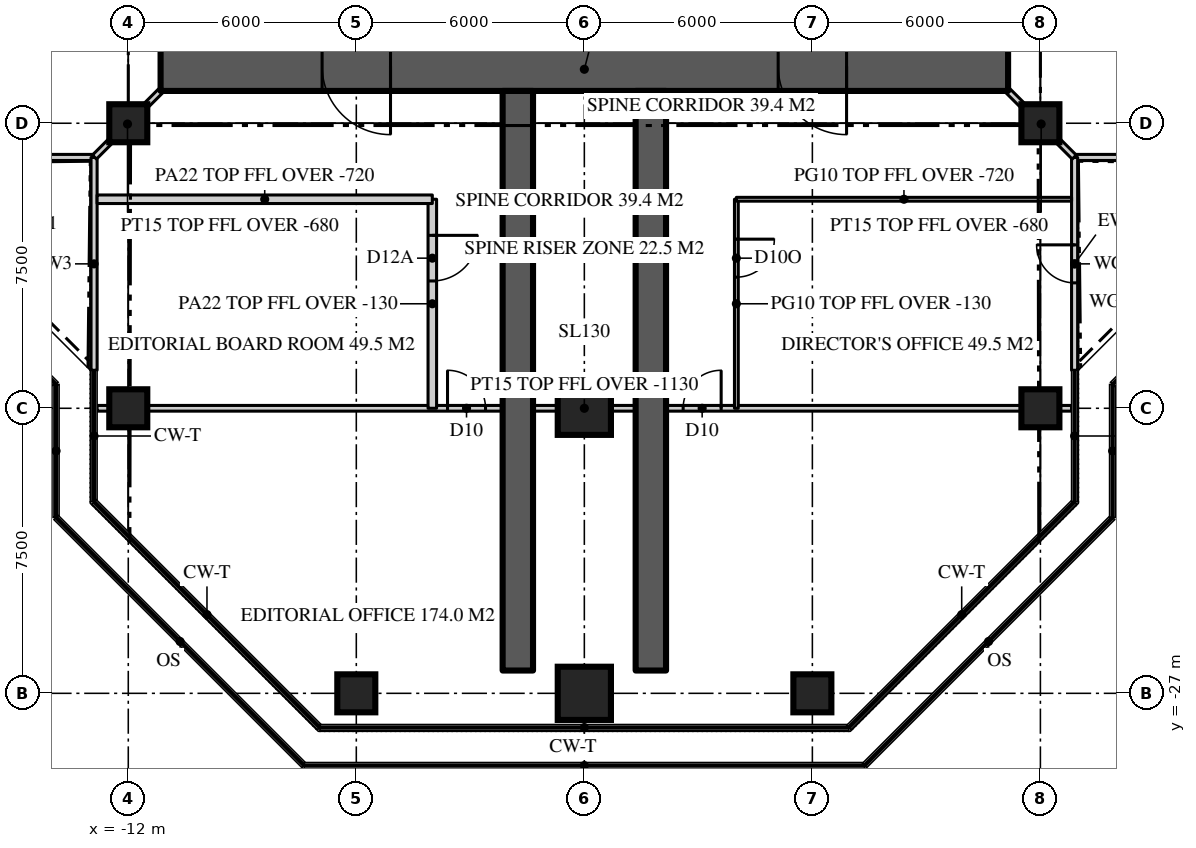
"""IFC4 building model, lengths in metres.
Left out: names, types, materials, properties, quantities, classifications, styles, units other than length and angle.
Written with IfcOpenShell. Run it as: python <this file> out.ifc"""

import sys

from ifc_helpers import new_model, si_unit, direction, frame, frame_2d, origin, origin_2d, place, context, subcontext, project, spatial, rectangle, extrude, element, fill, save


model = new_model("IFC4")
c1 = context("Model", 3, precision=1e-05, world=origin(), true_north=direction((0.0, 1.0)))
c2 = subcontext(c1, "Body", "Model", "MODEL_VIEW")
j1 = project(units=[si_unit("LENGTHUNIT", "METRE"), si_unit("PLANEANGLEUNIT", "RADIAN")], contexts=[c1])
p1 = place(None, origin())
s1 = spatial("IfcSite", under=j1, at=p1, CompositionType="ELEMENT")
p2 = place(p1, origin())
s2 = spatial("IfcBuilding", under=s1, at=p2, CompositionType="ELEMENT")
p3 = place(p2, frame((0.0, 0.0, 282.9)))
s3 = spatial("IfcBuildingStorey", under=s2, at=p3, CompositionType="ELEMENT", Elevation=282.9)
p4 = place(p3, frame((11.15, -10.5, 0.0), z_axis=(0.0, 0.0, 1.0), x_axis=(-1.0, 0.0, 0.0)))
e1 = element("IfcWall", 1, at=p4, inside=s3, PredefinedType="SHEAR", context=c2, shape_type="SweptSolid", body=[
    extrude(rectangle(XDim=22.3, YDim=1.3, at=frame_2d((11.15, 0.0))), origin(), (0.0, 0.0, 1.0), 3.9),
])
p5 = place(p4, frame((16.25, 0.0, 0.0)))
e2 = element("IfcOpeningElement", 2, at=p5, cuts=e1, PredefinedType="OPENING", context=c2, shape_type="SweptSolid", body=[
    extrude(rectangle(XDim=1.8, YDim=2.2, at=frame_2d((0.9, 1.1))), frame((0.0, 0.66, 0.0), z_axis=(0.0, -1.0, 0.0), x_axis=(1.0, 0.0, 0.0)), (0.0, 0.0, 1.0), 1.32),
])
p6 = place(p4, frame((4.25, 0.0, 0.0)))
e3 = element("IfcOpeningElement", 3, at=p6, cuts=e1, PredefinedType="OPENING", context=c2, shape_type="SweptSolid", body=[
    extrude(rectangle(XDim=1.8, YDim=2.2, at=frame_2d((0.9, 1.1))), frame((0.0, 0.66, 0.0), z_axis=(0.0, -1.0, 0.0), x_axis=(1.0, 0.0, 0.0)), (0.0, 0.0, 1.0), 1.32),
])
for number, where, z_axis, x_axis in (
    (4, (-1.75, -11.15, 0.0), (0.0, 0.0, 1.0), (0.0, -1.0, 0.0)),
    (5, (1.75, -11.15, 0.0), (0.0, 0.0, 1.0), (0.0, -1.0, 0.0)),
):
    element("IfcWall", number, at=place(p3, frame(where, z_axis=z_axis, x_axis=x_axis)), inside=s3, PredefinedType="SHEAR", context=c2, shape_type="SweptSolid", body=[
        extrude(rectangle(XDim=15.25, YDim=0.8, at=frame_2d((7.625, 0.0))), origin(), (0.0, 0.0, 1.0), 3.9),
    ])
p7 = place(p3, frame((-6.0, -27.0, 0.0), z_axis=(0.0, 0.0, 1.0), x_axis=(1.0, 0.0, 0.0)))
e6 = element("IfcColumn", 6, at=p7, inside=s3, PredefinedType="COLUMN", context=c2, shape_type="SweptSolid", body=[
    extrude(rectangle(XDim=1.0, YDim=1.0, at=origin_2d()), origin(), (0.0, 0.0, 1.0), 3.9),
])
p8 = place(p3, frame((0.0, -27.0, 0.0), z_axis=(0.0, 0.0, 1.0), x_axis=(1.0, 0.0, 0.0)))
e7 = element("IfcColumn", 7, at=p8, inside=s3, PredefinedType="COLUMN", context=c2, shape_type="SweptSolid", body=[
    extrude(rectangle(XDim=1.4, YDim=1.4, at=origin_2d()), origin(), (0.0, 0.0, 1.0), 3.9),
])
for number, where, z_axis, x_axis in (
    (8, (6.0, -27.0, 0.0), (0.0, 0.0, 1.0), (1.0, 0.0, 0.0)),
    (9, (-12.0, -19.5, 0.0), (0.0, 0.0, 1.0), (1.0, 0.0, 0.0)),
):
    element("IfcColumn", number, at=place(p3, frame(where, z_axis=z_axis, x_axis=x_axis)), inside=s3, PredefinedType="COLUMN", context=c2, shape_type="SweptSolid", body=[
        extrude(rectangle(XDim=1.0, YDim=1.0, at=origin_2d()), origin(), (0.0, 0.0, 1.0), 3.9),
    ])
p9 = place(p3, frame((0.0, -19.5, 0.0), z_axis=(0.0, 0.0, 1.0), x_axis=(1.0, 0.0, 0.0)))
e10 = element("IfcColumn", 10, at=p9, inside=s3, PredefinedType="COLUMN", context=c2, shape_type="SweptSolid", body=[
    extrude(rectangle(XDim=1.4, YDim=1.4, at=origin_2d()), origin(), (0.0, 0.0, 1.0), 3.9),
])
for number, where, z_axis, x_axis in (
    (11, (12.0, -19.5, 0.0), (0.0, 0.0, 1.0), (1.0, 0.0, 0.0)),
    (12, (-12.0, -12.0, 0.0), (0.0, 0.0, 1.0), (1.0, 0.0, 0.0)),
    (13, (12.0, -12.0, 0.0), (0.0, 0.0, 1.0), (1.0, 0.0, 0.0)),
):
    element("IfcColumn", number, at=place(p3, frame(where, z_axis=z_axis, x_axis=x_axis)), inside=s3, PredefinedType="COLUMN", context=c2, shape_type="SweptSolid", body=[
        extrude(rectangle(XDim=1.0, YDim=1.0, at=origin_2d()), origin(), (0.0, 0.0, 1.0), 3.9),
    ])
p10 = place(p3, frame((12.9, -12.9, 0.0), z_axis=(0.0, 0.0, 1.0), x_axis=(1.0, 0.0, 0.0)))
e14 = element("IfcWall", 14, at=p10, inside=s3, PredefinedType="SOLIDWALL", context=c2, shape_type="SweptSolid", body=[
    extrude(rectangle(XDim=5.6, YDim=0.16, at=frame_2d((2.8, 0.0))), origin(), (0.0, 0.0, 1.0), 3.77),
])
p11 = place(p3, frame((-18.5, -12.9, 0.0), z_axis=(0.0, 0.0, 1.0), x_axis=(1.0, 0.0, 0.0)))
e15 = element("IfcWall", 15, at=p11, inside=s3, PredefinedType="SOLIDWALL", context=c2, shape_type="SweptSolid", body=[
    extrude(rectangle(XDim=5.6, YDim=0.16, at=frame_2d((2.8, 0.0))), origin(), (0.0, 0.0, 1.0), 3.77),
])
p12 = place(p11, frame((2.3, 0.0, 0.0)))
e16 = element("IfcOpeningElement", 16, at=p12, cuts=e15, PredefinedType="OPENING", context=c2, shape_type="SweptSolid", body=[
    extrude(rectangle(XDim=1.0, YDim=2.2, at=frame_2d((0.5, 1.1))), frame((0.0, 0.09, 0.0), z_axis=(0.0, -1.0, 0.0), x_axis=(1.0, 0.0, 0.0)), (0.0, 0.0, 1.0), 0.18),
])
p13 = place(p3, frame((-12.9, -12.9, 0.0), z_axis=(0.0, 0.0, 1.0), x_axis=(0.0, -1.0, 0.0)))
e17 = element("IfcWall", 17, at=p13, inside=s3, PredefinedType="SOLIDWALL", context=c2, shape_type="SweptSolid", body=[
    extrude(rectangle(XDim=5.6, YDim=0.16, at=frame_2d((2.8, 0.0))), origin(), (0.0, 0.0, 1.0), 3.77),
])
p14 = place(p3, frame((12.9, -18.5, 0.0), z_axis=(0.0, 0.0, 1.0), x_axis=(0.0, 1.0, 0.0)))
e18 = element("IfcWall", 18, at=p14, inside=s3, PredefinedType="SOLIDWALL", context=c2, shape_type="SweptSolid", body=[
    extrude(rectangle(XDim=5.6, YDim=0.16, at=frame_2d((2.8, 0.0))), origin(), (0.0, 0.0, 1.0), 3.77),
])
p15 = place(p14, frame((2.3, 0.0, 0.0)))
e19 = element("IfcOpeningElement", 19, at=p15, cuts=e18, PredefinedType="OPENING", context=c2, shape_type="SweptSolid", body=[
    extrude(rectangle(XDim=1.0, YDim=2.2, at=frame_2d((0.5, 1.1))), frame((0.0, 0.09, 0.0), z_axis=(0.0, -1.0, 0.0), x_axis=(1.0, 0.0, 0.0)), (0.0, 0.0, 1.0), 0.18),
])
p16 = place(p3, frame((-12.82, -19.5, 0.0), z_axis=(0.0, 0.0, 1.0), x_axis=(1.0, 0.0, 0.0)))
e20 = element("IfcWall", 20, at=p16, inside=s3, PredefinedType="PARTITIONING", context=c2, shape_type="SweptSolid", body=[
    extrude(rectangle(XDim=25.64, YDim=0.15, at=frame_2d((12.82, 0.0))), origin(), (0.0, 0.0, 1.0), 2.77),
])
p17 = place(p16, frame((15.42, 0.0, 0.0)))
e21 = element("IfcOpeningElement", 21, at=p17, cuts=e20, PredefinedType="OPENING", context=c2, shape_type="SweptSolid", body=[
    extrude(rectangle(XDim=1.0, YDim=2.2, at=frame_2d((0.5, 1.1))), frame((0.0, 0.085, 0.0), z_axis=(0.0, -1.0, 0.0), x_axis=(1.0, 0.0, 0.0)), (0.0, 0.0, 1.0), 0.17),
])
p18 = place(p16, frame((9.22, 0.0, 0.0)))
e22 = element("IfcOpeningElement", 22, at=p18, cuts=e20, PredefinedType="OPENING", context=c2, shape_type="SweptSolid", body=[
    extrude(rectangle(XDim=1.0, YDim=2.2, at=frame_2d((0.5, 1.1))), frame((0.0, 0.085, 0.0), z_axis=(0.0, -1.0, 0.0), x_axis=(1.0, 0.0, 0.0)), (0.0, 0.0, 1.0), 0.17),
])
p19 = place(p3, frame((4.0, -14.0, 0.0), z_axis=(0.0, 0.0, 1.0), x_axis=(0.0, -1.0, 0.0)))
e23 = element("IfcWall", 23, at=p19, inside=s3, PredefinedType="PARTITIONING", context=c2, shape_type="SweptSolid", body=[
    extrude(rectangle(XDim=5.5, YDim=0.1, at=frame_2d((2.75, 0.0))), origin(), (0.0, 0.0, 1.0), 3.77),
])
p20 = place(p19, frame((1.05, 0.0, 0.0)))
e24 = element("IfcOpeningElement", 24, at=p20, cuts=e23, PredefinedType="OPENING", context=c2, shape_type="SweptSolid", body=[
    extrude(rectangle(XDim=1.0, YDim=2.2, at=frame_2d((0.5, 1.1))), frame((0.0, 0.06, 0.0), z_axis=(0.0, -1.0, 0.0), x_axis=(1.0, 0.0, 0.0)), (0.0, 0.0, 1.0), 0.12),
])
p21 = place(p3, frame((4.0, -14.0, 0.0), z_axis=(0.0, 0.0, 1.0), x_axis=(1.0, 0.0, 0.0)))
e25 = element("IfcWall", 25, at=p21, inside=s3, PredefinedType="PARTITIONING", context=c2, shape_type="SweptSolid", body=[
    extrude(rectangle(XDim=8.82, YDim=0.1, at=frame_2d((4.41, 0.0))), origin(), (0.0, 0.0, 1.0), 3.18),
])
p22 = place(p3, frame((-4.0, -14.0, 0.0), z_axis=(0.0, 0.0, 1.0), x_axis=(0.0, -1.0, 0.0)))
e26 = element("IfcWall", 26, at=p22, inside=s3, PredefinedType="PARTITIONING", context=c2, shape_type="SweptSolid", body=[
    extrude(rectangle(XDim=5.5, YDim=0.225, at=frame_2d((2.75, 0.0))), origin(), (0.0, 0.0, 1.0), 3.77),
])
p23 = place(p22, frame((0.95, 0.0, 0.0)))
e27 = element("IfcOpeningElement", 27, at=p23, cuts=e26, PredefinedType="OPENING", context=c2, shape_type="SweptSolid", body=[
    extrude(rectangle(XDim=1.2, YDim=2.2, at=frame_2d((0.6, 1.1))), frame((0.0, 0.123, 0.0), z_axis=(0.0, -1.0, 0.0), x_axis=(1.0, 0.0, 0.0)), (0.0, 0.0, 1.0), 0.245),
])
p24 = place(p3, frame((-4.0, -14.0, 0.0), z_axis=(0.0, 0.0, 1.0), x_axis=(-1.0, 0.0, 0.0)))
e28 = element("IfcWall", 28, at=p24, inside=s3, PredefinedType="PARTITIONING", context=c2, shape_type="SweptSolid", body=[
    extrude(rectangle(XDim=8.82, YDim=0.225, at=frame_2d((4.41, 0.0))), origin(), (0.0, 0.0, 1.0), 3.18),
])
for number, where, z_axis, x_axis in (
    (29, (-11.15, -11.15, 0.0), (0.0, 0.0, 1.0), (-0.707, -0.707, 0.0)),
    (30, (11.15, -11.15, 0.0), (0.0, 0.0, 1.0), (0.707, -0.707, 0.0)),
):
    element("IfcWall", number, at=place(p3, frame(where, z_axis=z_axis, x_axis=x_axis)), inside=s3, PredefinedType="PARTITIONING", context=c2, shape_type="SweptSolid", body=[
        extrude(rectangle(XDim=2.461, YDim=0.15, at=frame_2d((1.23, 0.0))), origin(), (0.0, 0.0, 1.0), 3.22),
    ])
p25 = place(p15, origin())
e31 = element("IfcDoor", 31, at=p25, inside=s3, OperationType="SINGLE_SWING_RIGHT", PredefinedType="DOOR", context=c2, shape_type="SweptSolid", body=[
    extrude(rectangle(XDim=1.0, YDim=2.2, at=frame_2d((0.5, 1.1))), frame((0.0, 0.025, 0.0), z_axis=(0.0, -1.0, 0.0), x_axis=(1.0, 0.0, 0.0)), (0.0, 0.0, 1.0), 0.05),
])
fill(e19, e31)
p26 = place(p5, origin())
e32 = element("IfcDoor", 32, at=p26, inside=s3, OperationType="DOUBLE_DOOR_DOUBLE_SWING", PredefinedType="DOOR", context=c2, shape_type="SweptSolid", body=[
    extrude(rectangle(XDim=1.8, YDim=2.2, at=frame_2d((0.9, 1.1))), frame((0.0, 0.025, 0.0), z_axis=(0.0, -1.0, 0.0), x_axis=(1.0, 0.0, 0.0)), (0.0, 0.0, 1.0), 0.05),
])
fill(e2, e32)
p27 = place(p6, origin())
e33 = element("IfcDoor", 33, at=p27, inside=s3, OperationType="DOUBLE_DOOR_DOUBLE_SWING", PredefinedType="DOOR", context=c2, shape_type="SweptSolid", body=[
    extrude(rectangle(XDim=1.8, YDim=2.2, at=frame_2d((0.9, 1.1))), frame((0.0, 0.025, 0.0), z_axis=(0.0, -1.0, 0.0), x_axis=(1.0, 0.0, 0.0)), (0.0, 0.0, 1.0), 0.05),
])
fill(e3, e33)
p28 = place(p17, origin())
e34 = element("IfcDoor", 34, at=p28, inside=s3, OperationType="SINGLE_SWING_RIGHT", PredefinedType="DOOR", context=c2, shape_type="SweptSolid", body=[
    extrude(rectangle(XDim=1.0, YDim=2.2, at=frame_2d((0.5, 1.1))), frame((0.0, 0.025, 0.0), z_axis=(0.0, -1.0, 0.0), x_axis=(1.0, 0.0, 0.0)), (0.0, 0.0, 1.0), 0.05),
])
fill(e21, e34)
p29 = place(p18, origin())
e35 = element("IfcDoor", 35, at=p29, inside=s3, OperationType="SINGLE_SWING_LEFT", PredefinedType="DOOR", context=c2, shape_type="SweptSolid", body=[
    extrude(rectangle(XDim=1.0, YDim=2.2, at=frame_2d((0.5, 1.1))), frame((0.0, 0.025, 0.0), z_axis=(0.0, -1.0, 0.0), x_axis=(1.0, 0.0, 0.0)), (0.0, 0.0, 1.0), 0.05),
])
fill(e22, e35)
p30 = place(p20, origin())
e36 = element("IfcDoor", 36, at=p30, inside=s3, OperationType="SINGLE_SWING_LEFT", PredefinedType="DOOR", context=c2, shape_type="SweptSolid", body=[
    extrude(rectangle(XDim=1.0, YDim=2.2, at=frame_2d((0.5, 1.1))), frame((0.0, 0.025, 0.0), z_axis=(0.0, -1.0, 0.0), x_axis=(1.0, 0.0, 0.0)), (0.0, 0.0, 1.0), 0.05),
])
fill(e24, e36)
p31 = place(p23, origin())
e37 = element("IfcDoor", 37, at=p31, inside=s3, OperationType="SINGLE_SWING_LEFT", PredefinedType="DOOR", context=c2, shape_type="SweptSolid", body=[
    extrude(rectangle(XDim=1.2, YDim=2.2, at=frame_2d((0.6, 1.1))), frame((0.0, 0.025, 0.0), z_axis=(0.0, -1.0, 0.0), x_axis=(1.0, 0.0, 0.0)), (0.0, 0.0, 1.0), 0.05),
])
fill(e27, e37)
save(model, sys.argv[1])
